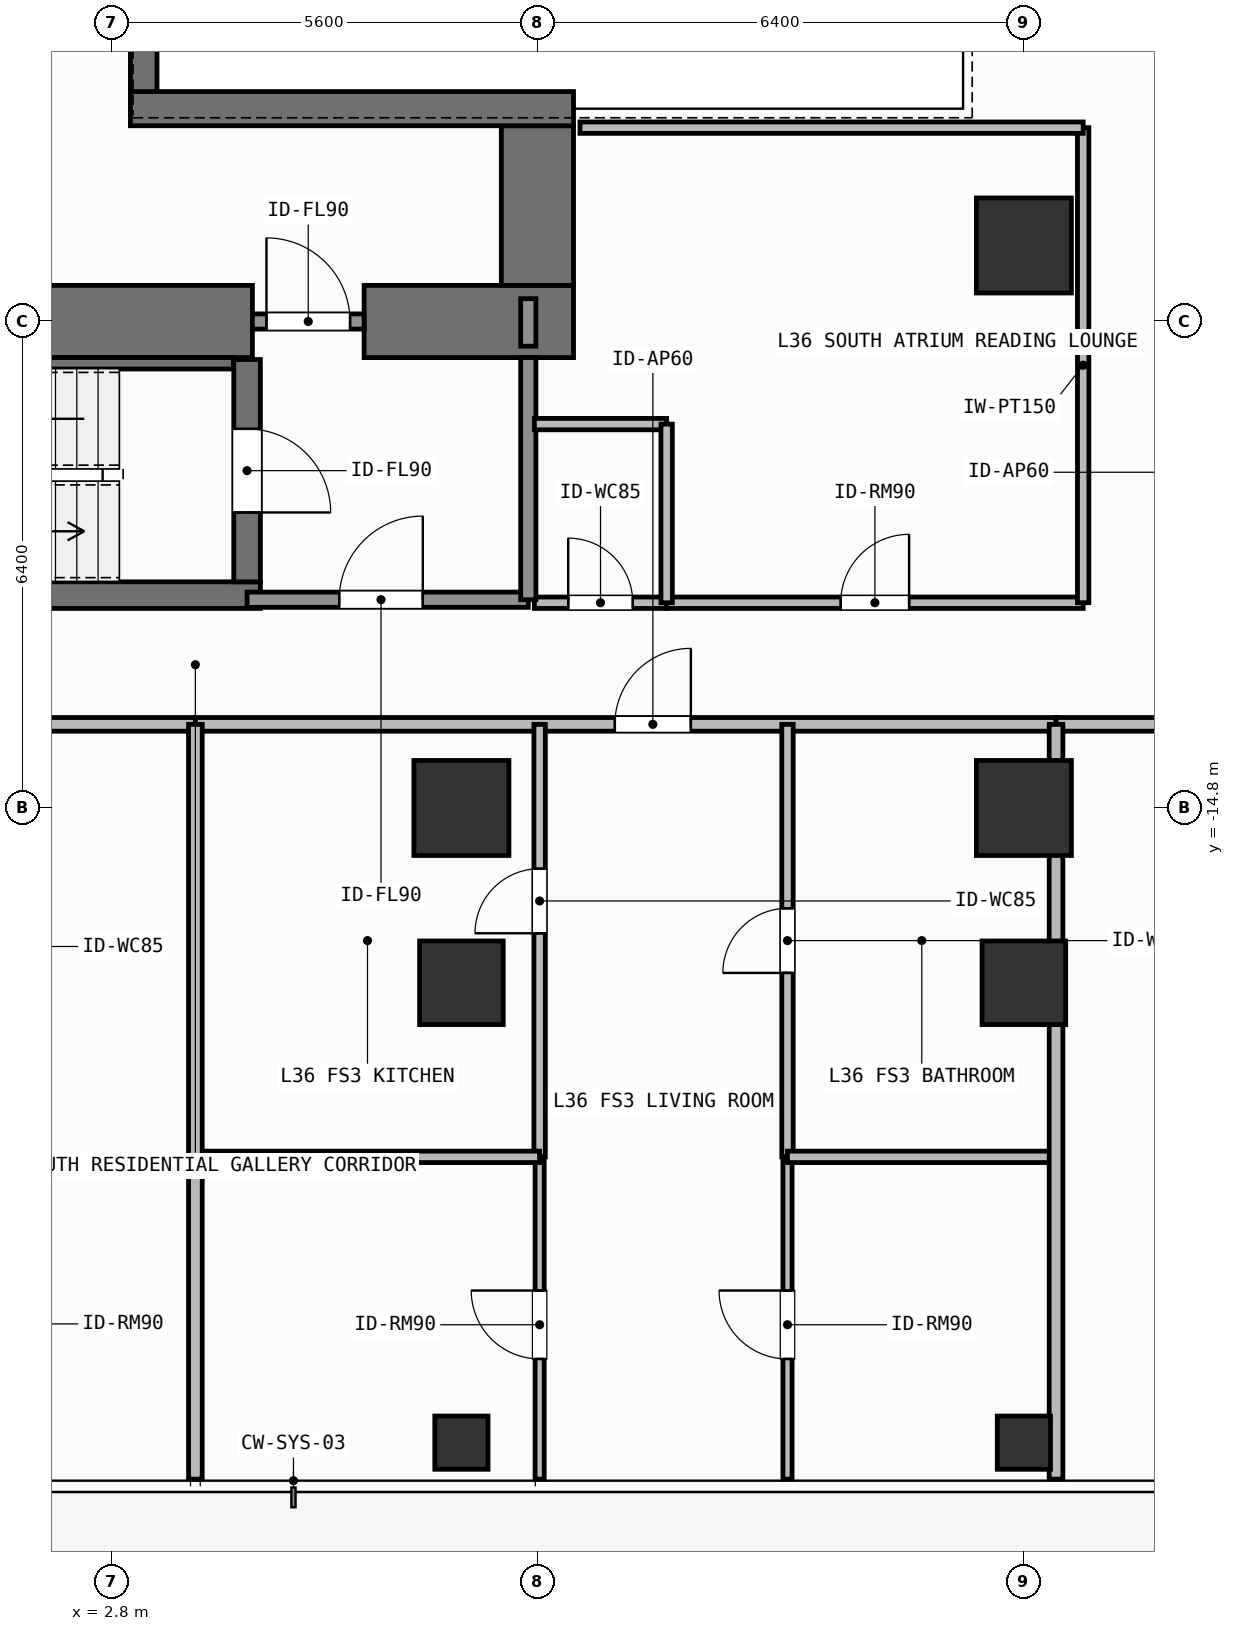
"""IFC4 building model, lengths in metres.
Left out: names, types, materials, properties, quantities, classifications, styles, units other than length and angle.
Written with IfcOpenShell. Run it as: python <this file> out.ifc"""

import sys

from ifc_helpers import new_model, si_unit, direction, frame, frame_2d, origin, origin_2d, place, context, subcontext, project, spatial, rectangle, hollow_rectangle, extrude, element, fill, save


model = new_model("IFC4")
c1 = context("Model", 3, precision=1e-05, world=origin(), true_north=direction((0.0, 1.0)))
c2 = subcontext(c1, "Body", "Model", "MODEL_VIEW")
j1 = project(units=[si_unit("LENGTHUNIT", "METRE"), si_unit("PLANEANGLEUNIT", "RADIAN")], contexts=[c1])
p1 = place(None, origin())
s1 = spatial("IfcSite", under=j1, at=p1, CompositionType="ELEMENT")
p2 = place(p1, origin())
s2 = spatial("IfcBuilding", under=s1, at=p2, CompositionType="ELEMENT")
p3 = place(p2, frame((0.0, 0.0, 144.6)))
s3 = spatial("IfcBuildingStorey", under=s2, at=p3, CompositionType="ELEMENT", Elevation=144.6)
p4 = place(p3, frame((-2.62, -8.4, 0.0), z_axis=(0.0, 0.0, 1.0), x_axis=(1.0, 0.0, 0.0)))
e1 = element("IfcWall", 1, at=p4, inside=s3, PredefinedType="SHEAR", context=c2, shape_type="SweptSolid", body=[
    extrude(rectangle(XDim=7.27, YDim=0.95, at=frame_2d((3.635, 0.0))), origin(), (0.0, 0.0, 1.0), 3.9),
])
p5 = place(p3, frame((6.12, -8.4, 0.0), z_axis=(0.0, 0.0, 1.0), x_axis=(1.0, 0.0, 0.0)))
e2 = element("IfcWall", 2, at=p5, inside=s3, PredefinedType="SHEAR", context=c2, shape_type="SweptSolid", body=[
    extrude(rectangle(XDim=2.755, YDim=0.95, at=frame_2d((1.377, 0.0))), origin(), (0.0, 0.0, 1.0), 3.9),
])
p6 = place(p3, frame((8.4, -7.925, 0.0), z_axis=(0.0, 0.0, 1.0), x_axis=(0.0, 1.0, 0.0)))
e3 = element("IfcWall", 3, at=p6, inside=s3, PredefinedType="SHEAR", context=c2, shape_type="SweptSolid", body=[
    extrude(rectangle(XDim=2.1, YDim=0.95, at=frame_2d((1.05, 0.0))), origin(), (0.0, 0.0, 1.0), 3.9),
])
p7 = place(p3, frame((3.045, -5.6, 0.0), z_axis=(0.0, 0.0, 1.0), x_axis=(1.0, 0.0, 0.0)))
e4 = element("IfcWall", 4, at=p7, inside=s3, PredefinedType="SHEAR", context=c2, shape_type="SweptSolid", body=[
    extrude(rectangle(XDim=5.83, YDim=0.45, at=frame_2d((2.915, 0.0))), origin(), (0.0, 0.0, 1.0), 3.9),
])
p8 = place(p3, frame((3.22, -5.375, 0.0), z_axis=(0.0, 0.0, 1.0), x_axis=(0.0, 1.0, 0.0)))
e5 = element("IfcWall", 5, at=p8, inside=s3, PredefinedType="SHEAR", context=c2, shape_type="SweptSolid", body=[
    extrude(rectangle(XDim=10.75, YDim=0.35, at=frame_2d((5.375, 0.0))), origin(), (0.0, 0.0, 1.0), 3.9),
])
p9 = place(p3, frame((-2.555, -12.0, 0.0), z_axis=(0.0, 0.0, 1.0), x_axis=(1.0, 0.0, 0.0)))
e6 = element("IfcWall", 6, at=p9, inside=s3, PredefinedType="SHEAR", context=c2, shape_type="SweptSolid", body=[
    extrude(rectangle(XDim=7.31, YDim=0.35, at=frame_2d((3.655, 0.0))), origin(), (0.0, 0.0, 1.0), 3.9),
])
p10 = place(p3, frame((-2.2, -8.95, 0.0), z_axis=(0.0, 0.0, 1.0), x_axis=(1.0, 0.0, 0.0)))
e7 = element("IfcWall", 7, at=p10, inside=s3, PredefinedType="SHEAR", context=c2, shape_type="SweptSolid", body=[
    extrude(rectangle(XDim=6.6, YDim=0.15, at=frame_2d((3.3, 0.0))), origin(), (0.0, 0.0, 1.0), 3.9),
])
p11 = place(p3, frame((4.58, -8.9, 0.0), z_axis=(0.0, 0.0, 1.0), x_axis=(0.0, -1.0, 0.0)))
e8 = element("IfcWall", 8, at=p11, inside=s3, PredefinedType="SHEAR", context=c2, shape_type="SweptSolid", body=[
    extrude(rectangle(XDim=2.925, YDim=0.35, at=frame_2d((1.462, 0.0))), origin(), (0.0, 0.0, 1.0), 3.9),
])
p12 = place(p11, frame((0.913, 0.0, 0.0)))
e9 = element("IfcOpeningElement", 9, at=p12, cuts=e8, PredefinedType="OPENING", context=c2, shape_type="SweptSolid", body=[
    extrude(rectangle(XDim=1.1, YDim=2.15, at=frame_2d((0.55, 1.075))), frame((0.0, 0.185, 0.0), z_axis=(0.0, -1.0, 0.0), x_axis=(1.0, 0.0, 0.0)), (0.0, 0.0, 1.0), 0.37),
])
for number, where, z_axis, x_axis in (
    (10, (7.4, -14.8, 0.0), (0.0, 0.0, 1.0), (1.0, 0.0, 0.0)),
    (11, (14.8, -14.8, 0.0), (0.0, 0.0, 1.0), (1.0, 0.0, 0.0)),
    (12, (14.8, -7.4, 0.0), (0.0, 0.0, 1.0), (1.0, 0.0, 0.0)),
):
    element("IfcColumn", number, at=place(p3, frame(where, z_axis=z_axis, x_axis=x_axis)), inside=s3, PredefinedType="COLUMN", context=c2, shape_type="SweptSolid", body=[
        extrude(rectangle(XDim=1.25, YDim=1.25, at=origin_2d()), origin(), (0.0, 0.0, 1.0), 3.9),
    ])
for number, where, z_axis, x_axis in (
    (13, (7.4, -17.1, 0.0), (0.0, 0.0, 1.0), (1.0, 0.0, 0.0)),
    (14, (14.8, -17.1, 0.0), (0.0, 0.0, 1.0), (1.0, 0.0, 0.0)),
):
    element("IfcColumn", number, at=place(p3, frame(where, z_axis=z_axis, x_axis=x_axis)), inside=s3, PredefinedType="COLUMN", context=c2, shape_type="SweptSolid", body=[
        extrude(rectangle(XDim=1.1, YDim=1.1, at=origin_2d()), origin(), (0.0, 0.0, 1.0), 3.9),
    ])
for number, where, z_axis, x_axis in (
    (15, (7.4, -23.15, 0.0), (0.0, 0.0, 1.0), (1.0, 0.0, 0.0)),
    (16, (14.8, -23.15, 0.0), (0.0, 0.0, 1.0), (1.0, 0.0, 0.0)),
):
    element("IfcColumn", number, at=place(p3, frame(where, z_axis=z_axis, x_axis=x_axis)), inside=s3, PredefinedType="COLUMN", context=c2, shape_type="SweptSolid", body=[
        extrude(hollow_rectangle(XDim=0.7, YDim=0.7, WallThickness=0.032, at=origin_2d()), origin(), (0.0, 0.0, 1.0), 3.9),
    ])
p13 = place(p3, frame((4.58, -12.06, 0.0), z_axis=(0.0, 0.0, 1.0), x_axis=(1.0, 0.0, 0.0)))
e17 = element("IfcWall", 17, at=p13, inside=s3, PredefinedType="SOLIDWALL", context=c2, shape_type="SweptSolid", body=[
    extrude(rectangle(XDim=3.7, YDim=0.2, at=frame_2d((1.85, 0.0))), origin(), (0.0, 0.0, 1.0), 3.68),
])
p14 = place(p13, frame((1.212, 0.0, 0.0)))
e18 = element("IfcOpeningElement", 18, at=p14, cuts=e17, PredefinedType="OPENING", context=c2, shape_type="SweptSolid", body=[
    extrude(rectangle(XDim=1.1, YDim=2.15, at=frame_2d((0.55, 1.075))), frame((0.0, 0.11, 0.0), z_axis=(0.0, -1.0, 0.0), x_axis=(1.0, 0.0, 0.0)), (0.0, 0.0, 1.0), 0.22),
])
p15 = place(p3, frame((4.65, -8.4, 0.0), z_axis=(0.0, 0.0, 1.0), x_axis=(1.0, 0.0, 0.0)))
e19 = element("IfcWall", 19, at=p15, inside=s3, PredefinedType="SOLIDWALL", context=c2, shape_type="SweptSolid", body=[
    extrude(rectangle(XDim=1.47, YDim=0.2, at=frame_2d((0.735, 0.0))), origin(), (0.0, 0.0, 1.0), 2.72),
])
p16 = place(p15, frame((0.185, 0.0, 0.0)))
e20 = element("IfcOpeningElement", 20, at=p16, cuts=e19, PredefinedType="OPENING", context=c2, shape_type="SweptSolid", body=[
    extrude(rectangle(XDim=1.1, YDim=2.15, at=frame_2d((0.55, 1.075))), frame((0.0, 0.11, 0.0), z_axis=(0.0, -1.0, 0.0), x_axis=(1.0, 0.0, 0.0)), (0.0, 0.0, 1.0), 0.22),
])
p17 = place(p3, frame((8.36, -12.1, 0.0), z_axis=(0.0, 0.0, 1.0), x_axis=(1.0, 0.0, 0.0)))
e21 = element("IfcWall", 21, at=p17, inside=s3, PredefinedType="PARTITIONING", context=c2, shape_type="SweptSolid", body=[
    extrude(rectangle(XDim=1.74, YDim=0.15, at=frame_2d((0.87, 0.0))), origin(), (0.0, 0.0, 1.0), 3.68),
])
p18 = place(p17, frame((0.445, 0.0, 0.0)))
e22 = element("IfcOpeningElement", 22, at=p18, cuts=e21, PredefinedType="OPENING", context=c2, shape_type="SweptSolid", body=[
    extrude(rectangle(XDim=0.85, YDim=2.1, at=frame_2d((0.425, 1.05))), frame((0.0, 0.085, 0.0), z_axis=(0.0, -1.0, 0.0), x_axis=(1.0, 0.0, 0.0)), (0.0, 0.0, 1.0), 0.17),
])
p19 = place(p3, frame((10.1, -12.1, 0.0), z_axis=(0.0, 0.0, 1.0), x_axis=(1.0, 0.0, 0.0)))
e23 = element("IfcWall", 23, at=p19, inside=s3, PredefinedType="PARTITIONING", context=c2, shape_type="SweptSolid", body=[
    extrude(rectangle(XDim=5.48, YDim=0.15, at=frame_2d((2.74, 0.0))), origin(), (0.0, 0.0, 1.0), 3.68),
])
p20 = place(p19, frame((2.29, 0.0, 0.0)))
e24 = element("IfcOpeningElement", 24, at=p20, cuts=e23, PredefinedType="OPENING", context=c2, shape_type="SweptSolid", body=[
    extrude(rectangle(XDim=0.9, YDim=2.1, at=frame_2d((0.45, 1.05))), frame((0.0, 0.085, 0.0), z_axis=(0.0, -1.0, 0.0), x_axis=(1.0, 0.0, 0.0)), (0.0, 0.0, 1.0), 0.17),
])
p21 = place(p3, frame((-7.423, -13.7, 0.0), z_axis=(0.0, 0.0, 1.0), x_axis=(1.0, 0.0, 0.0)))
e25 = element("IfcWall", 25, at=p21, inside=s3, PredefinedType="PARTITIONING", context=c2, shape_type="SweptSolid", body=[
    extrude(rectangle(XDim=11.323, YDim=0.18, at=frame_2d((5.662, 0.0))), origin(), (0.0, 0.0, 1.0), 3.68),
])
p22 = place(p21, frame((5.34, 0.0, 0.0)))
e26 = element("IfcOpeningElement", 26, at=p22, cuts=e25, PredefinedType="OPENING", context=c2, shape_type="SweptSolid", body=[
    extrude(rectangle(XDim=1.0, YDim=2.2, at=frame_2d((0.5, 1.1))), frame((0.0, 0.1, 0.0), z_axis=(0.0, -1.0, 0.0), x_axis=(1.0, 0.0, 0.0)), (0.0, 0.0, 1.0), 0.2),
])
p23 = place(p3, frame((3.9, -13.7, 0.0), z_axis=(0.0, 0.0, 1.0), x_axis=(1.0, 0.0, 0.0)))
e27 = element("IfcWall", 27, at=p23, inside=s3, PredefinedType="PARTITIONING", context=c2, shape_type="SweptSolid", body=[
    extrude(rectangle(XDim=11.323, YDim=0.18, at=frame_2d((5.662, 0.0))), origin(), (0.0, 0.0, 1.0), 3.68),
])
p24 = place(p23, frame((5.519, 0.0, 0.0)))
e28 = element("IfcOpeningElement", 28, at=p24, cuts=e27, PredefinedType="OPENING", context=c2, shape_type="SweptSolid", body=[
    extrude(rectangle(XDim=1.0, YDim=2.2, at=frame_2d((0.5, 1.1))), frame((0.0, 0.1, 0.0), z_axis=(0.0, -1.0, 0.0), x_axis=(1.0, 0.0, 0.0)), (0.0, 0.0, 1.0), 0.2),
])
p25 = place(p3, frame((8.429, -19.39, 0.0), z_axis=(0.0, 0.0, 1.0), x_axis=(0.0, 1.0, 0.0)))
e29 = element("IfcWall", 29, at=p25, inside=s3, PredefinedType="PARTITIONING", context=c2, shape_type="SweptSolid", body=[
    extrude(rectangle(XDim=5.69, YDim=0.15, at=frame_2d((2.845, 0.0))), origin(), (0.0, 0.0, 1.0), 3.68),
])
p26 = place(p25, frame((2.941, 0.0, 0.0)))
e30 = element("IfcOpeningElement", 30, at=p26, cuts=e29, PredefinedType="OPENING", context=c2, shape_type="SweptSolid", body=[
    extrude(rectangle(XDim=0.85, YDim=2.1, at=frame_2d((0.425, 1.05))), frame((0.0, 0.085, 0.0), z_axis=(0.0, -1.0, 0.0), x_axis=(1.0, 0.0, 0.0)), (0.0, 0.0, 1.0), 0.17),
])
p27 = place(p3, frame((8.429, -23.63, 0.0), z_axis=(0.0, 0.0, 1.0), x_axis=(0.0, 1.0, 0.0)))
e31 = element("IfcWall", 31, at=p27, inside=s3, PredefinedType="PARTITIONING", context=c2, shape_type="SweptSolid", body=[
    extrude(rectangle(XDim=4.24, YDim=0.12, at=frame_2d((2.12, 0.0))), origin(), (0.0, 0.0, 1.0), 3.68),
])
p28 = place(p27, frame((1.581, 0.0, 0.0)))
e32 = element("IfcOpeningElement", 32, at=p28, cuts=e31, PredefinedType="OPENING", context=c2, shape_type="SweptSolid", body=[
    extrude(rectangle(XDim=0.9, YDim=2.1, at=frame_2d((0.45, 1.05))), frame((0.0, 0.07, 0.0), z_axis=(0.0, -1.0, 0.0), x_axis=(1.0, 0.0, 0.0)), (0.0, 0.0, 1.0), 0.14),
])
p29 = place(p3, frame((11.69, -19.39, 0.0), z_axis=(0.0, 0.0, 1.0), x_axis=(0.0, 1.0, 0.0)))
e33 = element("IfcWall", 33, at=p29, inside=s3, PredefinedType="PARTITIONING", context=c2, shape_type="SweptSolid", body=[
    extrude(rectangle(XDim=5.69, YDim=0.15, at=frame_2d((2.845, 0.0))), origin(), (0.0, 0.0, 1.0), 3.68),
])
p30 = place(p29, frame((2.42, 0.0, 0.0)))
e34 = element("IfcOpeningElement", 34, at=p30, cuts=e33, PredefinedType="OPENING", context=c2, shape_type="SweptSolid", body=[
    extrude(rectangle(XDim=0.85, YDim=2.1, at=frame_2d((0.425, 1.05))), frame((0.0, 0.085, 0.0), z_axis=(0.0, -1.0, 0.0), x_axis=(1.0, 0.0, 0.0)), (0.0, 0.0, 1.0), 0.17),
])
p31 = place(p3, frame((11.69, -23.63, 0.0), z_axis=(0.0, 0.0, 1.0), x_axis=(0.0, 1.0, 0.0)))
e35 = element("IfcWall", 35, at=p31, inside=s3, PredefinedType="PARTITIONING", context=c2, shape_type="SweptSolid", body=[
    extrude(rectangle(XDim=4.24, YDim=0.12, at=frame_2d((2.12, 0.0))), origin(), (0.0, 0.0, 1.0), 3.68),
])
p32 = place(p31, frame((1.581, 0.0, 0.0)))
e36 = element("IfcOpeningElement", 36, at=p32, cuts=e35, PredefinedType="OPENING", context=c2, shape_type="SweptSolid", body=[
    extrude(rectangle(XDim=0.9, YDim=2.1, at=frame_2d((0.45, 1.05))), frame((0.0, 0.07, 0.0), z_axis=(0.0, -1.0, 0.0), x_axis=(1.0, 0.0, 0.0)), (0.0, 0.0, 1.0), 0.14),
])
p33 = place(p3, frame((15.223, -13.7, 0.0), z_axis=(0.0, 0.0, 1.0), x_axis=(1.0, 0.0, 0.0)))
e37 = element("IfcWall", 37, at=p33, inside=s3, PredefinedType="PARTITIONING", context=c2, shape_type="SweptSolid", body=[
    extrude(rectangle(XDim=8.897, YDim=0.18, at=frame_2d((4.449, 0.0))), origin(), (0.0, 0.0, 1.0), 3.68),
])
p34 = place(p33, frame((2.451, 0.0, 0.0)))
e38 = element("IfcOpeningElement", 38, at=p34, cuts=e37, PredefinedType="OPENING", context=c2, shape_type="SweptSolid", body=[
    extrude(rectangle(XDim=1.0, YDim=2.2, at=frame_2d((0.5, 1.1))), frame((0.0, 0.1, 0.0), z_axis=(0.0, -1.0, 0.0), x_axis=(1.0, 0.0, 0.0)), (0.0, 0.0, 1.0), 0.2),
])
p35 = place(p3, frame((8.28, -12.06, 0.0), z_axis=(0.0, 0.0, 1.0), x_axis=(0.0, 1.0, 0.0)))
e39 = element("IfcWall", 39, at=p35, inside=s3, PredefinedType="SOLIDWALL", context=c2, shape_type="SweptSolid", body=[
    extrude(rectangle(XDim=3.185, YDim=0.2, at=frame_2d((1.593, 0.0))), origin(), (0.0, 0.0, 1.0), 3.68),
])
p36 = place(p3, frame((8.28, -8.725, 0.0), z_axis=(0.0, 0.0, 1.0), x_axis=(0.0, 1.0, 0.0)))
e40 = element("IfcWall", 40, at=p36, inside=s3, PredefinedType="SOLIDWALL", context=c2, shape_type="SweptSolid", body=[
    extrude(rectangle(XDim=0.625, YDim=0.2, at=frame_2d((0.312, 0.0))), origin(), (0.0, 0.0, 1.0), 3.68),
])
p37 = place(p3, frame((8.36, -9.75, 0.0), z_axis=(0.0, 0.0, 1.0), x_axis=(1.0, 0.0, 0.0)))
e41 = element("IfcWall", 41, at=p37, inside=s3, PredefinedType="PARTITIONING", context=c2, shape_type="SweptSolid", body=[
    extrude(rectangle(XDim=1.74, YDim=0.15, at=frame_2d((0.87, 0.0))), origin(), (0.0, 0.0, 1.0), 3.68),
])
p38 = place(p3, frame((10.1, -12.1, 0.0), z_axis=(0.0, 0.0, 1.0), x_axis=(0.0, 1.0, 0.0)))
e42 = element("IfcWall", 42, at=p38, inside=s3, PredefinedType="PARTITIONING", context=c2, shape_type="SweptSolid", body=[
    extrude(rectangle(XDim=2.35, YDim=0.15, at=frame_2d((1.175, 0.0))), origin(), (0.0, 0.0, 1.0), 3.68),
])
p39 = place(p3, frame((15.58, -12.1, 0.0), z_axis=(0.0, 0.0, 1.0), x_axis=(0.0, 1.0, 0.0)))
e43 = element("IfcWall", 43, at=p39, inside=s3, PredefinedType="PARTITIONING", context=c2, shape_type="SweptSolid", body=[
    extrude(rectangle(XDim=6.25, YDim=0.15, at=frame_2d((3.125, 0.0))), origin(), (0.0, 0.0, 1.0), 3.68),
])
p40 = place(p3, frame((8.96, -5.85, 0.0), z_axis=(0.0, 0.0, 1.0), x_axis=(1.0, 0.0, 0.0)))
e44 = element("IfcWall", 44, at=p40, inside=s3, PredefinedType="PARTITIONING", context=c2, shape_type="SweptSolid", body=[
    extrude(rectangle(XDim=6.62, YDim=0.15, at=frame_2d((3.31, 0.0))), origin(), (0.0, 0.0, 1.0), 3.68),
])
p41 = place(p3, frame((1.05, -19.545, 0.0), z_axis=(0.0, 0.0, 1.0), x_axis=(1.0, 0.0, 0.0)))
e45 = element("IfcWall", 45, at=p41, inside=s3, PredefinedType="PARTITIONING", context=c2, shape_type="SweptSolid", body=[
    extrude(rectangle(XDim=2.85, YDim=0.15, at=frame_2d((1.425, 0.0))), origin(), (0.0, 0.0, 1.0), 3.68),
])
p42 = place(p3, frame((3.9, -19.39, 0.0), z_axis=(0.0, 0.0, 1.0), x_axis=(1.0, 0.0, 0.0)))
e46 = element("IfcWall", 46, at=p42, inside=s3, PredefinedType="PARTITIONING", context=c2, shape_type="SweptSolid", body=[
    extrude(rectangle(XDim=4.529, YDim=0.15, at=frame_2d((2.265, 0.0))), origin(), (0.0, 0.0, 1.0), 3.68),
])
p43 = place(p3, frame((11.69, -19.39, 0.0), z_axis=(0.0, 0.0, 1.0), x_axis=(1.0, 0.0, 0.0)))
e47 = element("IfcWall", 47, at=p43, inside=s3, PredefinedType="PARTITIONING", context=c2, shape_type="SweptSolid", body=[
    extrude(rectangle(XDim=3.533, YDim=0.15, at=frame_2d((1.767, 0.0))), origin(), (0.0, 0.0, 1.0), 3.68),
])
for number, where, z_axis, x_axis in (
    (48, (3.9, -23.63, 0.0), (0.0, 0.0, 1.0), (0.0, 1.0, 0.0)),
    (49, (15.223, -23.63, 0.0), (0.0, 0.0, 1.0), (0.0, 1.0, 0.0)),
):
    element("IfcWall", number, at=place(p3, frame(where, z_axis=z_axis, x_axis=x_axis)), inside=s3, PredefinedType="PARTITIONING", context=c2, shape_type="SweptSolid", body=[
        extrude(rectangle(XDim=9.93, YDim=0.18, at=frame_2d((4.965, 0.0))), origin(), (0.0, 0.0, 1.0), 3.68),
    ])
p44 = place(p12, origin())
e50 = element("IfcDoor", 50, at=p44, inside=s3, OperationType="SINGLE_SWING_RIGHT", PredefinedType="DOOR", context=c2, shape_type="SweptSolid", body=[
    extrude(rectangle(XDim=1.1, YDim=2.15, at=frame_2d((0.55, 1.075))), frame((0.0, 0.025, 0.0), z_axis=(0.0, -1.0, 0.0), x_axis=(1.0, 0.0, 0.0)), (0.0, 0.0, 1.0), 0.05),
])
fill(e9, e50)
p45 = place(p14, origin())
e51 = element("IfcDoor", 51, at=p45, inside=s3, OperationType="SINGLE_SWING_RIGHT", PredefinedType="DOOR", context=c2, shape_type="SweptSolid", body=[
    extrude(rectangle(XDim=1.1, YDim=2.15, at=frame_2d((0.55, 1.075))), frame((0.0, 0.025, 0.0), z_axis=(0.0, -1.0, 0.0), x_axis=(1.0, 0.0, 0.0)), (0.0, 0.0, 1.0), 0.05),
])
fill(e18, e51)
p46 = place(p16, origin())
e52 = element("IfcDoor", 52, at=p46, inside=s3, OperationType="SINGLE_SWING_LEFT", PredefinedType="DOOR", context=c2, shape_type="SweptSolid", body=[
    extrude(rectangle(XDim=1.1, YDim=2.15, at=frame_2d((0.55, 1.075))), frame((0.0, 0.025, 0.0), z_axis=(0.0, -1.0, 0.0), x_axis=(1.0, 0.0, 0.0)), (0.0, 0.0, 1.0), 0.05),
])
fill(e20, e52)
p47 = place(p18, origin())
e53 = element("IfcDoor", 53, at=p47, inside=s3, OperationType="SINGLE_SWING_LEFT", PredefinedType="DOOR", context=c2, shape_type="SweptSolid", body=[
    extrude(rectangle(XDim=0.85, YDim=2.1, at=frame_2d((0.425, 1.05))), frame((0.0, 0.025, 0.0), z_axis=(0.0, -1.0, 0.0), x_axis=(1.0, 0.0, 0.0)), (0.0, 0.0, 1.0), 0.05),
])
fill(e22, e53)
p48 = place(p20, origin())
e54 = element("IfcDoor", 54, at=p48, inside=s3, OperationType="SINGLE_SWING_RIGHT", PredefinedType="DOOR", context=c2, shape_type="SweptSolid", body=[
    extrude(rectangle(XDim=0.9, YDim=2.1, at=frame_2d((0.45, 1.05))), frame((0.0, 0.025, 0.0), z_axis=(0.0, -1.0, 0.0), x_axis=(1.0, 0.0, 0.0)), (0.0, 0.0, 1.0), 0.05),
])
fill(e24, e54)
p49 = place(p24, origin())
e55 = element("IfcDoor", 55, at=p49, inside=s3, OperationType="SINGLE_SWING_RIGHT", PredefinedType="DOOR", context=c2, shape_type="SweptSolid", body=[
    extrude(rectangle(XDim=1.0, YDim=2.2, at=frame_2d((0.5, 1.1))), frame((0.0, 0.025, 0.0), z_axis=(0.0, -1.0, 0.0), x_axis=(1.0, 0.0, 0.0)), (0.0, 0.0, 1.0), 0.05),
])
fill(e28, e55)
p50 = place(p26, origin())
e56 = element("IfcDoor", 56, at=p50, inside=s3, OperationType="SINGLE_SWING_LEFT", PredefinedType="DOOR", context=c2, shape_type="SweptSolid", body=[
    extrude(rectangle(XDim=0.85, YDim=2.1, at=frame_2d((0.425, 1.05))), frame((0.0, 0.025, 0.0), z_axis=(0.0, -1.0, 0.0), x_axis=(1.0, 0.0, 0.0)), (0.0, 0.0, 1.0), 0.05),
])
fill(e30, e56)
p51 = place(p28, origin())
e57 = element("IfcDoor", 57, at=p51, inside=s3, OperationType="SINGLE_SWING_RIGHT", PredefinedType="DOOR", context=c2, shape_type="SweptSolid", body=[
    extrude(rectangle(XDim=0.9, YDim=2.1, at=frame_2d((0.45, 1.05))), frame((0.0, 0.025, 0.0), z_axis=(0.0, -1.0, 0.0), x_axis=(1.0, 0.0, 0.0)), (0.0, 0.0, 1.0), 0.05),
])
fill(e32, e57)
p52 = place(p30, origin())
e58 = element("IfcDoor", 58, at=p52, inside=s3, OperationType="SINGLE_SWING_LEFT", PredefinedType="DOOR", context=c2, shape_type="SweptSolid", body=[
    extrude(rectangle(XDim=0.85, YDim=2.1, at=frame_2d((0.425, 1.05))), frame((0.0, 0.025, 0.0), z_axis=(0.0, -1.0, 0.0), x_axis=(1.0, 0.0, 0.0)), (0.0, 0.0, 1.0), 0.05),
])
fill(e34, e58)
p53 = place(p32, origin())
e59 = element("IfcDoor", 59, at=p53, inside=s3, OperationType="SINGLE_SWING_RIGHT", PredefinedType="DOOR", context=c2, shape_type="SweptSolid", body=[
    extrude(rectangle(XDim=0.9, YDim=2.1, at=frame_2d((0.45, 1.05))), frame((0.0, 0.025, 0.0), z_axis=(0.0, -1.0, 0.0), x_axis=(1.0, 0.0, 0.0)), (0.0, 0.0, 1.0), 0.05),
])
fill(e36, e59)
save(model, sys.argv[1])
